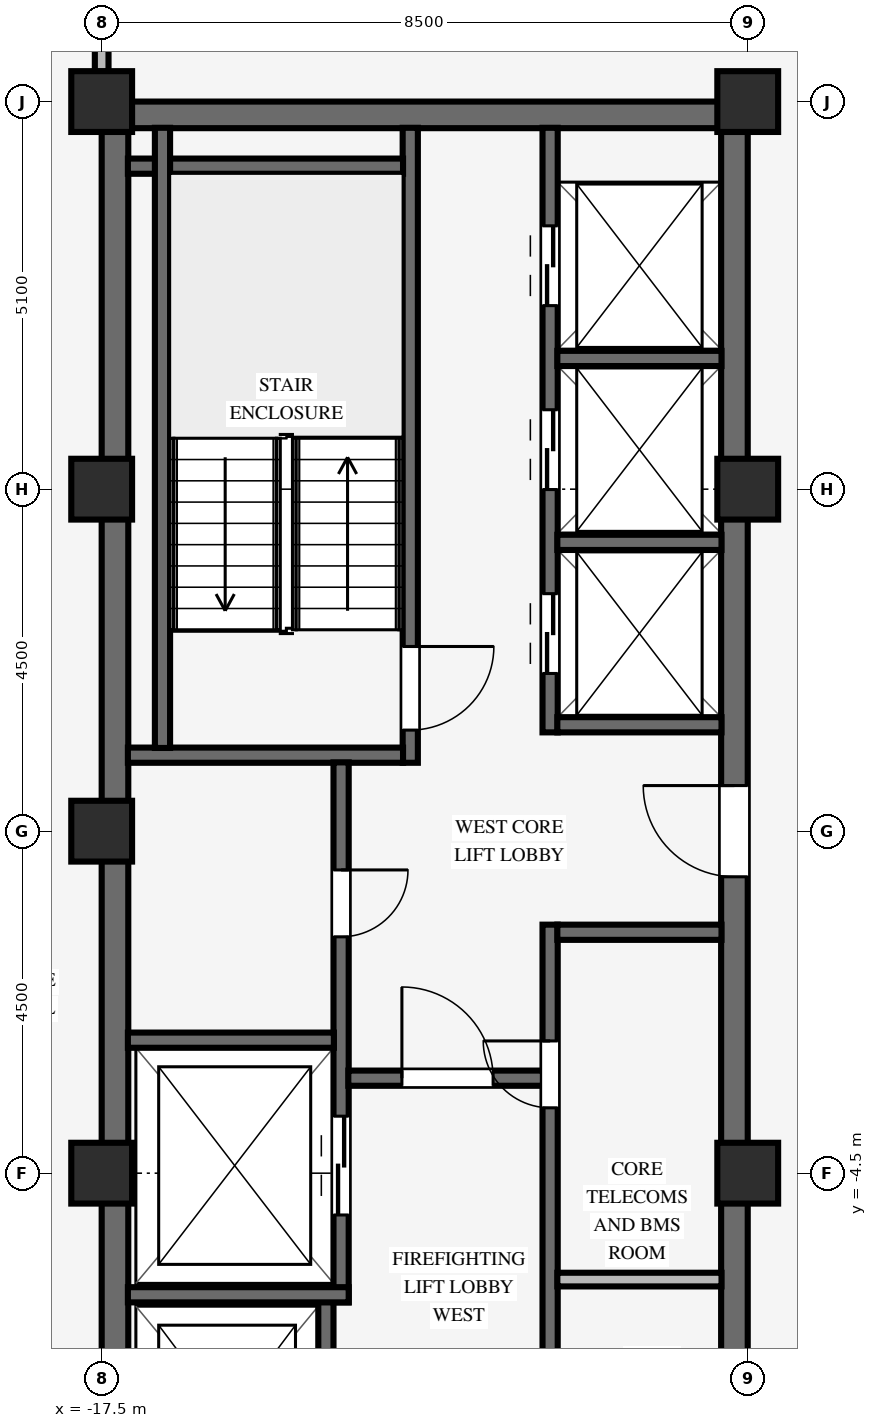
"""IFC4 building model, lengths in metres.
Left out: names, types, materials, properties, quantities, classifications, styles, units other than length and angle.
Written with IfcOpenShell. Run it as: python <this file> out.ifc"""

import sys

from ifc_helpers import new_model, si_unit, direction, frame, frame_2d, origin, origin_2d, place, context, subcontext, project, spatial, rectangle, extrude, source, transform, mapped, element, fill, save


model = new_model("IFC4")
c1 = context("Model", 3, precision=1e-05, world=origin(), true_north=direction((0.0, 1.0)))
c2 = subcontext(c1, "Body", "Model", "MODEL_VIEW")
j1 = project(units=[si_unit("LENGTHUNIT", "METRE"), si_unit("PLANEANGLEUNIT", "RADIAN")], contexts=[c1])
p1 = place(None, origin())
s1 = spatial("IfcSite", under=j1, at=p1, CompositionType="ELEMENT")
p2 = place(p1, origin())
s2 = spatial("IfcBuilding", under=s1, at=p2, CompositionType="ELEMENT")
p3 = place(p2, frame((0.0, 0.0, 283.5)))
s3 = spatial("IfcBuildingStorey", under=s2, at=p3, CompositionType="ELEMENT", Elevation=283.5)
p4 = place(p3, frame((-17.5, 9.425, 0.0), z_axis=(0.0, 0.0, 1.0), x_axis=(1.0, 0.0, 0.0)))
e1 = element("IfcWall", 1, at=p4, inside=s3, PredefinedType="SHEAR", context=c2, shape_type="SweptSolid", body=[
    extrude(rectangle(XDim=8.5, YDim=0.35, at=frame_2d((4.25, 0.0))), origin(), (0.0, 0.0, 1.0), 3.25),
])
p5 = place(p3, frame((-17.325, -9.255, 0.0), z_axis=(0.0, 0.0, 1.0), x_axis=(0.0, 1.0, 0.0)))
e2 = element("IfcWall", 2, at=p5, inside=s3, PredefinedType="SHEAR", context=c2, shape_type="SweptSolid", body=[
    extrude(rectangle(XDim=18.51, YDim=0.35, at=frame_2d((9.255, 0.0))), origin(), (0.0, 0.0, 1.0), 3.25),
])
p6 = place(p3, frame((-9.175, -9.255, 0.0), z_axis=(0.0, 0.0, 1.0), x_axis=(0.0, 1.0, 0.0)))
e3 = element("IfcWall", 3, at=p6, inside=s3, PredefinedType="SHEAR", context=c2, shape_type="SweptSolid", body=[
    extrude(rectangle(XDim=18.51, YDim=0.35, at=frame_2d((9.255, 0.0))), origin(), (0.0, 0.0, 1.0), 3.25),
])
p7 = place(p6, frame((8.655, 0.0, 0.0)))
e4 = element("IfcOpeningElement", 4, at=p7, cuts=e3, PredefinedType="OPENING", context=c2, shape_type="SweptSolid", body=[
    extrude(rectangle(XDim=1.2, YDim=2.15, at=frame_2d((0.6, 1.075))), frame((0.0, 0.185, 0.0), z_axis=(0.0, -1.0, 0.0), x_axis=(1.0, 0.0, 0.0)), (0.0, 0.0, 1.0), 0.37),
])
for number, where, z_axis, x_axis in (
    (5, (-17.5, -4.5, 0.0), (0.0, 0.0, 1.0), (1.0, 0.0, 0.0)),
    (6, (-17.5, 4.5, 0.0), (0.0, 0.0, 1.0), (1.0, 0.0, 0.0)),
    (7, (-17.5, 9.6, 0.0), (0.0, 0.0, 1.0), (1.0, 0.0, 0.0)),
    (8, (-9.0, -4.5, 0.0), (0.0, 0.0, 1.0), (1.0, 0.0, 0.0)),
    (9, (-9.0, 4.5, 0.0), (0.0, 0.0, 1.0), (1.0, 0.0, 0.0)),
    (10, (-9.0, 9.6, 0.0), (0.0, 0.0, 1.0), (1.0, 0.0, 0.0)),
    (11, (-17.5, 0.0, 0.0), (0.0, 0.0, 1.0), (1.0, 0.0, 0.0)),
):
    element("IfcColumn", number, at=place(p3, frame(where, z_axis=z_axis, x_axis=x_axis)), inside=s3, PredefinedType="COLUMN", context=c2, shape_type="SweptSolid", body=[
        extrude(rectangle(XDim=0.8, YDim=0.8, at=origin_2d()), origin(), (0.0, 0.0, 1.0), 3.25),
    ])
p8 = place(p3, frame((-13.44, 0.9, 0.0), z_axis=(0.0, 0.0, 1.0), x_axis=(0.0, 1.0, 0.0)))
e12 = element("IfcWall", 12, at=p8, inside=s3, PredefinedType="SHEAR", context=c2, shape_type="SweptSolid", body=[
    extrude(rectangle(XDim=8.355, YDim=0.2, at=frame_2d((4.177, 0.0))), origin(), (0.0, 0.0, 1.0), 3.25),
])
p9 = place(p8, frame((1.53, 0.0, 0.0), z_axis=(0.0, 0.0, 1.0), x_axis=(-1.0, 0.0, 0.0)))
e13 = element("IfcOpeningElement", 13, at=p9, cuts=e12, PredefinedType="OPENING", context=c2, shape_type="SweptSolid", body=[
    extrude(rectangle(XDim=1.1, YDim=2.15, at=frame_2d((0.55, 1.075))), frame((0.0, 0.11, 0.0), z_axis=(0.0, -1.0, 0.0), x_axis=(1.0, 0.0, 0.0)), (0.0, 0.0, 1.0), 0.22),
])
for number, where, z_axis, x_axis in (
    (14, (-17.155, 1.0, 0.0), (0.0, 0.0, 1.0), (1.0, 0.0, 0.0)),
    (15, (-17.155, 8.75, 0.0), (0.0, 0.0, 1.0), (1.0, 0.0, 0.0)),
):
    element("IfcWall", number, at=place(p3, frame(where, z_axis=z_axis, x_axis=x_axis)), inside=s3, PredefinedType="SHEAR", context=c2, shape_type="SweptSolid", body=[
        extrude(rectangle(XDim=3.62, YDim=0.2, at=frame_2d((1.81, 0.0))), origin(), (0.0, 0.0, 1.0), 3.25),
    ])
p10 = place(p3, frame((-16.7, 1.095, 0.0), z_axis=(0.0, 0.0, 1.0), x_axis=(0.0, 1.0, 0.0)))
e16 = element("IfcWall", 16, at=p10, inside=s3, PredefinedType="SHEAR", context=c2, shape_type="SweptSolid", body=[
    extrude(rectangle(XDim=8.16, YDim=0.2, at=frame_2d((4.08, 0.0))), origin(), (0.0, 0.0, 1.0), 3.25),
])
p11 = place(p3, frame((-14.55, -9.255, 0.0), z_axis=(0.0, 0.0, 1.0), x_axis=(0.0, 1.0, 0.0)))
e17 = element("IfcWall", 17, at=p11, inside=s3, PredefinedType="SHEAR", context=c2, shape_type="SweptSolid", body=[
    extrude(rectangle(XDim=3.06, YDim=0.2, at=frame_2d((1.53, 0.0))), origin(), (0.0, 0.0, 1.0), 3.25),
])
p12 = place(p11, frame((0.98, 0.0, 0.0)))
e18 = element("IfcOpeningElement", 18, at=p12, cuts=e17, PredefinedType="OPENING", context=c2, shape_type="SweptSolid", body=[
    extrude(rectangle(XDim=1.15, YDim=2.15, at=frame_2d((0.575, 1.075))), frame((0.0, 0.11, 0.0), z_axis=(0.0, -1.0, 0.0), x_axis=(1.0, 0.0, 0.0)), (0.0, 0.0, 1.0), 0.22),
])
p13 = place(p3, frame((-14.35, -6.2, 0.0), z_axis=(0.0, 0.0, 1.0), x_axis=(0.0, 1.0, 0.0)))
e19 = element("IfcWall", 19, at=p13, inside=s3, PredefinedType="SHEAR", context=c2, shape_type="SweptSolid", body=[
    extrude(rectangle(XDim=7.105, YDim=0.2, at=frame_2d((3.552, 0.0))), origin(), (0.0, 0.0, 1.0), 3.25),
])
p14 = place(p13, frame((5.69, 0.0, 0.0), z_axis=(0.0, 0.0, 1.0), x_axis=(-1.0, 0.0, 0.0)))
e20 = element("IfcOpeningElement", 20, at=p14, cuts=e19, PredefinedType="OPENING", context=c2, shape_type="SweptSolid", body=[
    extrude(rectangle(XDim=0.88, YDim=2.1, at=frame_2d((0.44, 1.05))), frame((0.0, 0.11, 0.0), z_axis=(0.0, -1.0, 0.0), x_axis=(1.0, 0.0, 0.0)), (0.0, 0.0, 1.0), 0.22),
])
p15 = place(p13, frame((1.15, 0.0, 0.0)))
e21 = element("IfcOpeningElement", 21, at=p15, cuts=e19, PredefinedType="OPENING", context=c2, shape_type="SweptSolid", body=[
    extrude(rectangle(XDim=1.3, YDim=2.2, at=frame_2d((0.65, 1.1))), frame((0.0, 0.11, 0.0), z_axis=(0.0, -1.0, 0.0), x_axis=(1.0, 0.0, 0.0)), (0.0, 0.0, 1.0), 0.22),
])
p16 = place(p3, frame((-17.155, -6.1, 0.0), z_axis=(0.0, 0.0, 1.0), x_axis=(1.0, 0.0, 0.0)))
e22 = element("IfcWall", 22, at=p16, inside=s3, PredefinedType="SHEAR", context=c2, shape_type="SweptSolid", body=[
    extrude(rectangle(XDim=2.905, YDim=0.2, at=frame_2d((1.453, 0.0))), origin(), (0.0, 0.0, 1.0), 3.25),
])
p17 = place(p3, frame((-17.155, -2.75, 0.0), z_axis=(0.0, 0.0, 1.0), x_axis=(1.0, 0.0, 0.0)))
e23 = element("IfcWall", 23, at=p17, inside=s3, PredefinedType="SHEAR", context=c2, shape_type="SweptSolid", body=[
    extrude(rectangle(XDim=2.71, YDim=0.2, at=frame_2d((1.355, 0.0))), origin(), (0.0, 0.0, 1.0), 3.25),
])
p18 = place(p3, frame((-11.6, -9.255, 0.0), z_axis=(0.0, 0.0, 1.0), x_axis=(0.0, 1.0, 0.0)))
e24 = element("IfcWall", 24, at=p18, inside=s3, PredefinedType="SHEAR", context=c2, shape_type="SweptSolid", body=[
    extrude(rectangle(XDim=8.025, YDim=0.2, at=frame_2d((4.012, 0.0))), origin(), (0.0, 0.0, 1.0), 3.25),
])
p19 = place(p18, frame((1.315, 0.0, 0.0)))
e25 = element("IfcOpeningElement", 25, at=p19, cuts=e24, PredefinedType="OPENING", context=c2, shape_type="SweptSolid", body=[
    extrude(rectangle(XDim=0.88, YDim=2.1, at=frame_2d((0.44, 1.05))), frame((0.0, 0.11, 0.0), z_axis=(0.0, -1.0, 0.0), x_axis=(1.0, 0.0, 0.0)), (0.0, 0.0, 1.0), 0.22),
])
p20 = place(p18, frame((5.615, 0.0, 0.0)))
e26 = element("IfcOpeningElement", 26, at=p20, cuts=e24, PredefinedType="OPENING", context=c2, shape_type="SweptSolid", body=[
    extrude(rectangle(XDim=0.88, YDim=2.1, at=frame_2d((0.44, 1.05))), frame((0.0, 0.11, 0.0), z_axis=(0.0, -1.0, 0.0), x_axis=(1.0, 0.0, 0.0)), (0.0, 0.0, 1.0), 0.22),
])
p21 = place(p3, frame((-14.255, -3.25, 0.0), z_axis=(0.0, 0.0, 1.0), x_axis=(1.0, 0.0, 0.0)))
e27 = element("IfcWall", 27, at=p21, inside=s3, PredefinedType="SHEAR", context=c2, shape_type="SweptSolid", body=[
    extrude(rectangle(XDim=2.56, YDim=0.2, at=frame_2d((1.28, 0.0))), origin(), (0.0, 0.0, 1.0), 3.25),
])
p22 = place(p21, frame((0.705, 0.0, 0.0)))
e28 = element("IfcOpeningElement", 28, at=p22, cuts=e27, PredefinedType="OPENING", context=c2, shape_type="SweptSolid", body=[
    extrude(rectangle(XDim=1.2, YDim=2.15, at=frame_2d((0.6, 1.075))), frame((0.0, 0.11, 0.0), z_axis=(0.0, -1.0, 0.0), x_axis=(1.0, 0.0, 0.0)), (0.0, 0.0, 1.0), 0.22),
])
p23 = place(p3, frame((-11.505, -1.33, 0.0), z_axis=(0.0, 0.0, 1.0), x_axis=(1.0, 0.0, 0.0)))
e29 = element("IfcWall", 29, at=p23, inside=s3, PredefinedType="SHEAR", context=c2, shape_type="SweptSolid", body=[
    extrude(rectangle(XDim=2.16, YDim=0.2, at=frame_2d((1.08, 0.0))), origin(), (0.0, 0.0, 1.0), 3.25),
])
p24 = place(p3, frame((-11.505, -5.9, 0.0), z_axis=(0.0, 0.0, 1.0), x_axis=(1.0, 0.0, 0.0)))
e30 = element("IfcWall", 30, at=p24, inside=s3, PredefinedType="PARTITIONING", context=c2, shape_type="SweptSolid", body=[
    extrude(rectangle(XDim=2.16, YDim=0.18, at=frame_2d((1.08, 0.0))), origin(), (0.0, 0.0, 1.0), 3.24),
])
p25 = place(p3, frame((-11.6, 1.3, 0.0), z_axis=(0.0, 0.0, 1.0), x_axis=(0.0, 1.0, 0.0)))
e31 = element("IfcWall", 31, at=p25, inside=s3, PredefinedType="SHEAR", context=c2, shape_type="SweptSolid", body=[
    extrude(rectangle(XDim=7.955, YDim=0.2, at=frame_2d((3.978, 0.0))), origin(), (0.0, 0.0, 1.0), 3.25),
])
p26 = place(p25, frame((0.775, 0.0, 0.0)))
e32 = element("IfcOpeningElement", 32, at=p26, cuts=e31, PredefinedType="OPENING", context=c2, shape_type="SweptSolid", body=[
    extrude(rectangle(XDim=1.05, YDim=2.15, at=frame_2d((0.525, 1.075))), frame((0.0, 0.11, 0.0), z_axis=(0.0, -1.0, 0.0), x_axis=(1.0, 0.0, 0.0)), (0.0, 0.0, 1.0), 0.22),
])
p27 = place(p25, frame((3.195, 0.0, 0.0)))
e33 = element("IfcOpeningElement", 33, at=p27, cuts=e31, PredefinedType="OPENING", context=c2, shape_type="SweptSolid", body=[
    extrude(rectangle(XDim=1.05, YDim=2.15, at=frame_2d((0.525, 1.075))), frame((0.0, 0.11, 0.0), z_axis=(0.0, -1.0, 0.0), x_axis=(1.0, 0.0, 0.0)), (0.0, 0.0, 1.0), 0.22),
])
p28 = place(p25, frame((5.615, 0.0, 0.0)))
e34 = element("IfcOpeningElement", 34, at=p28, cuts=e31, PredefinedType="OPENING", context=c2, shape_type="SweptSolid", body=[
    extrude(rectangle(XDim=1.05, YDim=2.15, at=frame_2d((0.525, 1.075))), frame((0.0, 0.11, 0.0), z_axis=(0.0, -1.0, 0.0), x_axis=(1.0, 0.0, 0.0)), (0.0, 0.0, 1.0), 0.22),
])
for number, where, z_axis, x_axis in (
    (35, (-11.505, 1.4, 0.0), (0.0, 0.0, 1.0), (1.0, 0.0, 0.0)),
    (36, (-11.505, 3.8, 0.0), (0.0, 0.0, 1.0), (1.0, 0.0, 0.0)),
    (37, (-11.505, 6.22, 0.0), (0.0, 0.0, 1.0), (1.0, 0.0, 0.0)),
):
    element("IfcWall", number, at=place(p3, frame(where, z_axis=z_axis, x_axis=x_axis)), inside=s3, PredefinedType="SHEAR", context=c2, shape_type="SweptSolid", body=[
        extrude(rectangle(XDim=2.16, YDim=0.2, at=frame_2d((1.08, 0.0))), origin(), (0.0, 0.0, 1.0), 3.25),
    ])
p29 = place(p3, frame((-17.5, 9.996, 0.0), z_axis=(0.0, 0.0, 1.0), x_axis=(0.0, 1.0, 0.0)))
e38 = element("IfcWall", 38, at=p29, inside=s3, PredefinedType="PARTITIONING", context=c2, shape_type="SweptSolid", body=[
    extrude(rectangle(XDim=1.118, YDim=0.18, at=frame_2d((0.559, 0.0))), origin(), (0.0, 0.0, 1.0), 3.24),
])
m1 = source(origin(), c2, "Body", "SweptSolid", [
    extrude(rectangle(XDim=1.1, YDim=2.15, at=frame_2d((0.55, 1.075))), frame((0.0, 0.025, 0.0), z_axis=(0.0, -1.0, 0.0), x_axis=(1.0, 0.0, 0.0)), (0.0, 0.0, 1.0), 0.05),
])
p30 = place(p9, origin())
e39 = element("IfcDoor", 39, at=p30, inside=s3, OperationType="SINGLE_SWING_LEFT", PredefinedType="DOOR", context=c2, shape_type="MappedRepresentation", body=[
    mapped(m1, transform((0.0, 0.0, 0.0), scale=1.0)),
])
fill(e13, e39)
m2 = source(origin(), c2, "Body", "SweptSolid", [
    extrude(rectangle(XDim=0.88, YDim=2.1, at=frame_2d((0.44, 1.05))), frame((0.0, 0.025, 0.0), z_axis=(0.0, -1.0, 0.0), x_axis=(1.0, 0.0, 0.0)), (0.0, 0.0, 1.0), 0.05),
])
p31 = place(p14, origin())
e40 = element("IfcDoor", 40, at=p31, inside=s3, OperationType="SINGLE_SWING_LEFT", PredefinedType="DOOR", context=c2, shape_type="MappedRepresentation", body=[
    mapped(m2, transform((0.0, 0.0, 0.0), scale=1.0)),
])
fill(e20, e40)
m3 = source(origin(), c2, "Body", "SweptSolid", [
    extrude(rectangle(XDim=1.2, YDim=2.15, at=frame_2d((0.6, 1.075))), frame((0.0, 0.025, 0.0), z_axis=(0.0, -1.0, 0.0), x_axis=(1.0, 0.0, 0.0)), (0.0, 0.0, 1.0), 0.05),
])
p32 = place(p22, origin())
e41 = element("IfcDoor", 41, at=p32, inside=s3, OperationType="SINGLE_SWING_LEFT", PredefinedType="DOOR", context=c2, shape_type="MappedRepresentation", body=[
    mapped(m3, transform((0.0, 0.0, 0.0), scale=1.0)),
])
fill(e28, e41)
p33 = place(p20, origin())
e42 = element("IfcDoor", 42, at=p33, inside=s3, OperationType="SINGLE_SWING_RIGHT", PredefinedType="DOOR", context=c2, shape_type="MappedRepresentation", body=[
    mapped(m2, transform((0.0, 0.0, 0.0), scale=1.0)),
])
fill(e26, e42)
p34 = place(p7, origin())
e43 = element("IfcDoor", 43, at=p34, inside=s3, OperationType="SINGLE_SWING_RIGHT", PredefinedType="DOOR", context=c2, shape_type="MappedRepresentation", body=[
    mapped(m3, transform((0.0, 0.0, 0.0), scale=1.0)),
])
fill(e4, e43)
m4 = source(origin(), c2, "Body", "SweptSolid", [
    extrude(rectangle(XDim=1.3, YDim=2.2, at=frame_2d((0.65, 1.1))), frame((0.0, 0.025, 0.0), z_axis=(0.0, -1.0, 0.0), x_axis=(1.0, 0.0, 0.0)), (0.0, 0.0, 1.0), 0.05),
])
p35 = place(p15, origin())
e44 = element("IfcDoor", 44, at=p35, inside=s3, OperationType="DOUBLE_DOOR_SLIDING", PredefinedType="DOOR", context=c2, shape_type="MappedRepresentation", body=[
    mapped(m4, transform((0.0, 0.0, 0.0), scale=1.0)),
])
fill(e21, e44)
m5 = source(origin(), c2, "Body", "SweptSolid", [
    extrude(rectangle(XDim=1.05, YDim=2.15, at=frame_2d((0.525, 1.075))), frame((0.0, 0.025, 0.0), z_axis=(0.0, -1.0, 0.0), x_axis=(1.0, 0.0, 0.0)), (0.0, 0.0, 1.0), 0.05),
])
p36 = place(p26, origin())
e45 = element("IfcDoor", 45, at=p36, inside=s3, OperationType="DOUBLE_DOOR_SLIDING", PredefinedType="DOOR", context=c2, shape_type="MappedRepresentation", body=[
    mapped(m5, transform((0.0, 0.0, 0.0), scale=1.0)),
])
fill(e32, e45)
p37 = place(p27, origin())
e46 = element("IfcDoor", 46, at=p37, inside=s3, OperationType="DOUBLE_DOOR_SLIDING", PredefinedType="DOOR", context=c2, shape_type="MappedRepresentation", body=[
    mapped(m5, transform((0.0, 0.0, 0.0), scale=1.0)),
])
fill(e33, e46)
p38 = place(p28, origin())
e47 = element("IfcDoor", 47, at=p38, inside=s3, OperationType="DOUBLE_DOOR_SLIDING", PredefinedType="DOOR", context=c2, shape_type="MappedRepresentation", body=[
    mapped(m5, transform((0.0, 0.0, 0.0), scale=1.0)),
])
fill(e34, e47)
save(model, sys.argv[1])
